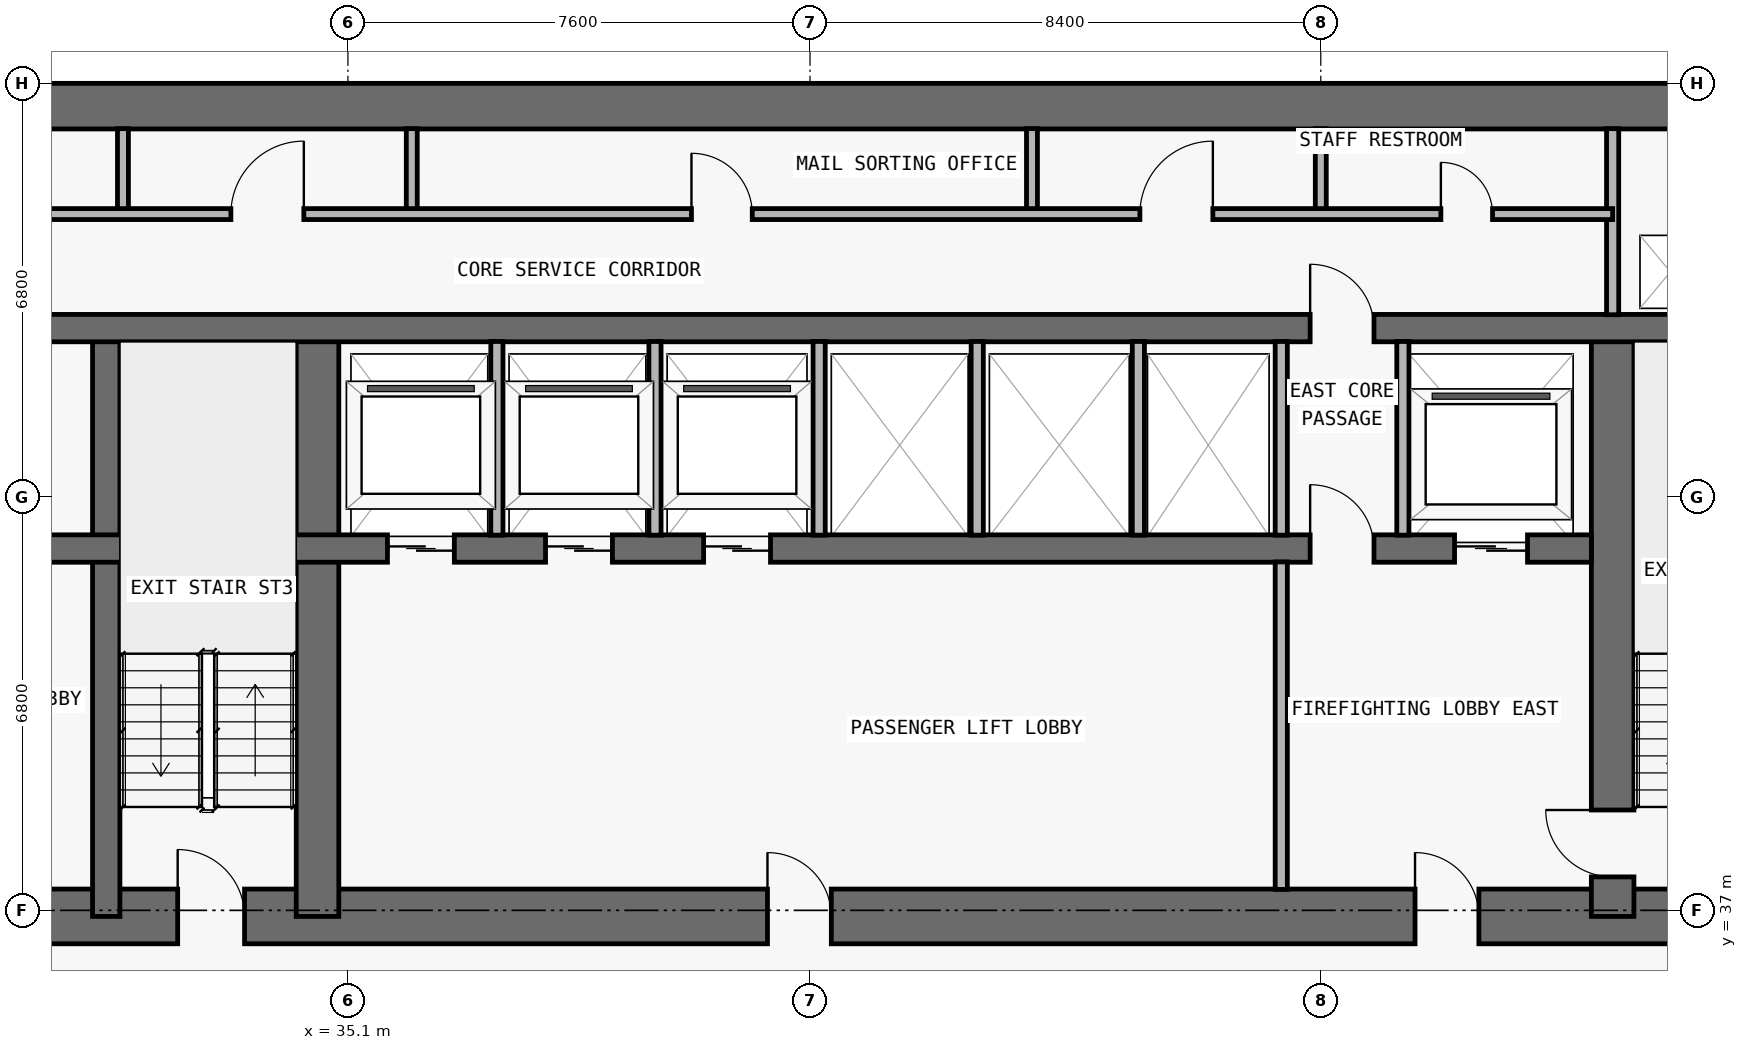
"""IFC4 building model, lengths in metres.
Left out: names, types, materials, properties, quantities, classifications, styles, units other than length and angle.
Written with IfcOpenShell. Run it as: python <this file> out.ifc"""

import sys

from ifc_helpers import new_model, si_unit, direction, frame, frame_2d, origin, place, context, subcontext, project, spatial, rectangle, extrude, element, fill, save


model = new_model("IFC4")
c1 = context("Model", 3, precision=1e-05, world=origin(), true_north=direction((0.0, 1.0)))
c2 = subcontext(c1, "Body", "Model", "MODEL_VIEW")
j1 = project(units=[si_unit("LENGTHUNIT", "METRE"), si_unit("PLANEANGLEUNIT", "RADIAN")], contexts=[c1])
p1 = place(None, origin())
s1 = spatial("IfcSite", under=j1, at=p1, CompositionType="ELEMENT")
p2 = place(p1, origin())
s2 = spatial("IfcBuilding", under=s1, at=p2, CompositionType="ELEMENT")
p3 = place(p2, frame((0.0, 0.0, 63.0)))
s3 = spatial("IfcBuildingStorey", under=s2, at=p3, CompositionType="ELEMENT", Elevation=63.0)
p4 = place(p3, frame((17.75, 36.9, 0.0), z_axis=(0.0, 0.0, 1.0), x_axis=(1.0, 0.0, 0.0)))
e1 = element("IfcWall", 1, at=p4, inside=s3, PredefinedType="SHEAR", context=c2, shape_type="SweptSolid", body=[
    extrude(rectangle(XDim=42.3, YDim=0.9, at=frame_2d((21.15, 0.0))), origin(), (0.0, 0.0, 1.0), 3.05),
])
p5 = place(p4, frame((14.55, 0.0, 0.0)))
e2 = element("IfcOpeningElement", 2, at=p5, cuts=e1, PredefinedType="OPENING", context=c2, shape_type="SweptSolid", body=[
    extrude(rectangle(XDim=1.1, YDim=2.15, at=frame_2d((0.55, 1.075))), frame((0.0, 0.46, 0.0), z_axis=(0.0, -1.0, 0.0), x_axis=(1.0, 0.0, 0.0)), (0.0, 0.0, 1.0), 0.92),
])
p6 = place(p4, frame((6.4, 0.0, 0.0)))
e3 = element("IfcOpeningElement", 3, at=p6, cuts=e1, PredefinedType="OPENING", context=c2, shape_type="SweptSolid", body=[
    extrude(rectangle(XDim=1.05, YDim=2.15, at=frame_2d((0.525, 1.075))), frame((0.0, 0.46, 0.0), z_axis=(0.0, -1.0, 0.0), x_axis=(1.0, 0.0, 0.0)), (0.0, 0.0, 1.0), 0.92),
])
p7 = place(p4, frame((34.9, 0.0, 0.0)))
e4 = element("IfcOpeningElement", 4, at=p7, cuts=e1, PredefinedType="OPENING", context=c2, shape_type="SweptSolid", body=[
    extrude(rectangle(XDim=1.05, YDim=2.15, at=frame_2d((0.525, 1.075))), frame((0.0, 0.46, 0.0), z_axis=(0.0, -1.0, 0.0), x_axis=(1.0, 0.0, 0.0)), (0.0, 0.0, 1.0), 0.92),
])
p8 = place(p4, frame((11.012, 0.0, 0.0)))
e5 = element("IfcOpeningElement", 5, at=p8, cuts=e1, PredefinedType="OPENING", context=c2, shape_type="SweptSolid", body=[
    extrude(rectangle(XDim=1.05, YDim=2.15, at=frame_2d((0.525, 1.075))), frame((0.0, 0.46, 0.0), z_axis=(0.0, -1.0, 0.0), x_axis=(1.0, 0.0, 0.0)), (0.0, 0.0, 1.0), 0.92),
])
p9 = place(p4, frame((24.25, 0.0, 0.0)))
e6 = element("IfcOpeningElement", 6, at=p9, cuts=e1, PredefinedType="OPENING", context=c2, shape_type="SweptSolid", body=[
    extrude(rectangle(XDim=1.05, YDim=2.15, at=frame_2d((0.525, 1.075))), frame((0.0, 0.46, 0.0), z_axis=(0.0, -1.0, 0.0), x_axis=(1.0, 0.0, 0.0)), (0.0, 0.0, 1.0), 0.92),
])
p10 = place(p3, frame((17.75, 50.225, 0.0), z_axis=(0.0, 0.0, 1.0), x_axis=(1.0, 0.0, 0.0)))
e7 = element("IfcWall", 7, at=p10, inside=s3, PredefinedType="SHEAR", context=c2, shape_type="SweptSolid", body=[
    extrude(rectangle(XDim=42.3, YDim=0.75, at=frame_2d((21.15, 0.0))), origin(), (0.0, 0.0, 1.0), 3.05),
])
p11 = place(p3, frame((55.9, 36.9, 0.0), z_axis=(0.0, 0.0, 1.0), x_axis=(0.0, 1.0, 0.0)))
e8 = element("IfcWall", 8, at=p11, inside=s3, PredefinedType="SHEAR", context=c2, shape_type="SweptSolid", body=[
    extrude(rectangle(XDim=9.675, YDim=0.7, at=frame_2d((4.837, 0.0))), origin(), (0.0, 0.0, 1.0), 3.05),
])
p12 = place(p11, frame((0.65, 0.0, 0.0)))
e9 = element("IfcOpeningElement", 9, at=p12, cuts=e8, PredefinedType="OPENING", context=c2, shape_type="SweptSolid", body=[
    extrude(rectangle(XDim=1.1, YDim=2.15, at=frame_2d((0.55, 1.075))), frame((0.0, 0.36, 0.0), z_axis=(0.0, -1.0, 0.0), x_axis=(1.0, 0.0, 0.0)), (0.0, 0.0, 1.0), 0.72),
])
p13 = place(p3, frame((31.125, 36.9, 0.0), z_axis=(0.0, 0.0, 1.0), x_axis=(0.0, 1.0, 0.0)))
e10 = element("IfcWall", 10, at=p13, inside=s3, PredefinedType="SHEAR", context=c2, shape_type="SweptSolid", body=[
    extrude(rectangle(XDim=9.675, YDim=0.45, at=frame_2d((4.837, 0.0))), origin(), (0.0, 0.0, 1.0), 3.05),
])
p14 = place(p3, frame((34.6, 36.9, 0.0), z_axis=(0.0, 0.0, 1.0), x_axis=(0.0, 1.0, 0.0)))
e11 = element("IfcWall", 11, at=p14, inside=s3, PredefinedType="SHEAR", context=c2, shape_type="SweptSolid", body=[
    extrude(rectangle(XDim=9.675, YDim=0.7, at=frame_2d((4.837, 0.0))), origin(), (0.0, 0.0, 1.0), 3.05),
])
p15 = place(p3, frame((22.25, 42.95, 0.0), z_axis=(0.0, 0.0, 1.0), x_axis=(1.0, 0.0, 0.0)))
e12 = element("IfcWall", 12, at=p15, inside=s3, PredefinedType="SHEAR", context=c2, shape_type="SweptSolid", body=[
    extrude(rectangle(XDim=33.3, YDim=0.45, at=frame_2d((16.65, 0.0))), origin(), (0.0, 0.0, 1.0), 3.05),
])
p16 = place(p15, frame((1.05, 0.0, 0.0)))
e13 = element("IfcOpeningElement", 13, at=p16, cuts=e12, PredefinedType="OPENING", context=c2, shape_type="SweptSolid", body=[
    extrude(rectangle(XDim=1.2, YDim=2.2, at=frame_2d((0.6, 1.1))), frame((0.0, 0.235, 0.0), z_axis=(0.0, -1.0, 0.0), x_axis=(1.0, 0.0, 0.0)), (0.0, 0.0, 1.0), 0.47),
])
p17 = place(p15, frame((31.05, 0.0, 0.0)))
e14 = element("IfcOpeningElement", 14, at=p17, cuts=e12, PredefinedType="OPENING", context=c2, shape_type="SweptSolid", body=[
    extrude(rectangle(XDim=1.2, YDim=2.2, at=frame_2d((0.6, 1.1))), frame((0.0, 0.235, 0.0), z_axis=(0.0, -1.0, 0.0), x_axis=(1.0, 0.0, 0.0)), (0.0, 0.0, 1.0), 0.47),
])
p18 = place(p15, frame((13.5, 0.0, 0.0)))
e15 = element("IfcOpeningElement", 15, at=p18, cuts=e12, PredefinedType="OPENING", context=c2, shape_type="SweptSolid", body=[
    extrude(rectangle(XDim=1.1, YDim=2.2, at=frame_2d((0.55, 1.1))), frame((0.0, 0.235, 0.0), z_axis=(0.0, -1.0, 0.0), x_axis=(1.0, 0.0, 0.0)), (0.0, 0.0, 1.0), 0.47),
])
p19 = place(p15, frame((16.1, 0.0, 0.0)))
e16 = element("IfcOpeningElement", 16, at=p19, cuts=e12, PredefinedType="OPENING", context=c2, shape_type="SweptSolid", body=[
    extrude(rectangle(XDim=1.1, YDim=2.2, at=frame_2d((0.55, 1.1))), frame((0.0, 0.235, 0.0), z_axis=(0.0, -1.0, 0.0), x_axis=(1.0, 0.0, 0.0)), (0.0, 0.0, 1.0), 0.47),
])
p20 = place(p15, frame((18.7, 0.0, 0.0)))
e17 = element("IfcOpeningElement", 17, at=p20, cuts=e12, PredefinedType="OPENING", context=c2, shape_type="SweptSolid", body=[
    extrude(rectangle(XDim=1.1, YDim=2.2, at=frame_2d((0.55, 1.1))), frame((0.0, 0.235, 0.0), z_axis=(0.0, -1.0, 0.0), x_axis=(1.0, 0.0, 0.0)), (0.0, 0.0, 1.0), 0.47),
])
p21 = place(p15, frame((3.625, 0.0, 0.0)))
e18 = element("IfcOpeningElement", 18, at=p21, cuts=e12, PredefinedType="OPENING", context=c2, shape_type="SweptSolid", body=[
    extrude(rectangle(XDim=1.05, YDim=2.15, at=frame_2d((0.525, 1.075))), frame((0.0, 0.235, 0.0), z_axis=(0.0, -1.0, 0.0), x_axis=(1.0, 0.0, 0.0)), (0.0, 0.0, 1.0), 0.47),
])
p22 = place(p15, frame((28.675, 0.0, 0.0)))
e19 = element("IfcOpeningElement", 19, at=p22, cuts=e12, PredefinedType="OPENING", context=c2, shape_type="SweptSolid", body=[
    extrude(rectangle(XDim=1.05, YDim=2.15, at=frame_2d((0.525, 1.075))), frame((0.0, 0.235, 0.0), z_axis=(0.0, -1.0, 0.0), x_axis=(1.0, 0.0, 0.0)), (0.0, 0.0, 1.0), 0.47),
])
p23 = place(p3, frame((18.2, 46.575, 0.0), z_axis=(0.0, 0.0, 1.0), x_axis=(1.0, 0.0, 0.0)))
e20 = element("IfcWall", 20, at=p23, inside=s3, PredefinedType="SHEAR", context=c2, shape_type="SweptSolid", body=[
    extrude(rectangle(XDim=41.4, YDim=0.45, at=frame_2d((20.7, 0.0))), origin(), (0.0, 0.0, 1.0), 3.05),
])
p24 = place(p23, frame((7.675, 0.0, 0.0)))
e21 = element("IfcOpeningElement", 21, at=p24, cuts=e20, PredefinedType="OPENING", context=c2, shape_type="SweptSolid", body=[
    extrude(rectangle(XDim=1.05, YDim=2.15, at=frame_2d((0.525, 1.075))), frame((0.0, 0.235, 0.0), z_axis=(0.0, -1.0, 0.0), x_axis=(1.0, 0.0, 0.0)), (0.0, 0.0, 1.0), 0.47),
])
p25 = place(p23, frame((32.725, 0.0, 0.0)))
e22 = element("IfcOpeningElement", 22, at=p25, cuts=e20, PredefinedType="OPENING", context=c2, shape_type="SweptSolid", body=[
    extrude(rectangle(XDim=1.05, YDim=2.15, at=frame_2d((0.525, 1.075))), frame((0.0, 0.235, 0.0), z_axis=(0.0, -1.0, 0.0), x_axis=(1.0, 0.0, 0.0)), (0.0, 0.0, 1.0), 0.47),
])
for number, where, z_axis, x_axis in (
    (23, (31.4, 48.45, 0.0), (0.0, 0.0, 1.0), (0.0, 1.0, 0.0)),
    (24, (36.15, 48.45, 0.0), (0.0, 0.0, 1.0), (0.0, 1.0, 0.0)),
):
    element("IfcWall", number, at=place(p3, frame(where, z_axis=z_axis, x_axis=x_axis)), inside=s3, PredefinedType="PARTITIONING", context=c2, shape_type="SweptSolid", body=[
        extrude(rectangle(XDim=1.405, YDim=0.18, at=frame_2d((0.703, 0.0))), origin(), (0.0, 0.0, 1.0), 3.05),
    ])
for number, where, z_axis, x_axis in (
    (25, (37.55, 43.17, 0.0), (0.0, 0.0, 1.0), (0.0, 1.0, 0.0)),
    (26, (40.15, 43.17, 0.0), (0.0, 0.0, 1.0), (0.0, 1.0, 0.0)),
    (27, (42.85, 43.17, 0.0), (0.0, 0.0, 1.0), (0.0, 1.0, 0.0)),
    (28, (45.45, 43.17, 0.0), (0.0, 0.0, 1.0), (0.0, 1.0, 0.0)),
):
    element("IfcWall", number, at=place(p3, frame(where, z_axis=z_axis, x_axis=x_axis)), inside=s3, PredefinedType="PARTITIONING", context=c2, shape_type="SweptSolid", body=[
        extrude(rectangle(XDim=3.185, YDim=0.2, at=frame_2d((1.593, 0.0))), origin(), (0.0, 0.0, 1.0), 3.05),
    ])
p26 = place(p3, frame((46.35, 48.45, 0.0), z_axis=(0.0, 0.0, 1.0), x_axis=(0.0, 1.0, 0.0)))
e29 = element("IfcWall", 29, at=p26, inside=s3, PredefinedType="PARTITIONING", context=c2, shape_type="SweptSolid", body=[
    extrude(rectangle(XDim=1.405, YDim=0.18, at=frame_2d((0.703, 0.0))), origin(), (0.0, 0.0, 1.0), 3.05),
])
p27 = place(p3, frame((48.1, 43.17, 0.0), z_axis=(0.0, 0.0, 1.0), x_axis=(0.0, 1.0, 0.0)))
e30 = element("IfcWall", 30, at=p27, inside=s3, PredefinedType="PARTITIONING", context=c2, shape_type="SweptSolid", body=[
    extrude(rectangle(XDim=3.185, YDim=0.2, at=frame_2d((1.593, 0.0))), origin(), (0.0, 0.0, 1.0), 3.05),
])
p28 = place(p3, frame((50.45, 37.345, 0.0), z_axis=(0.0, 0.0, 1.0), x_axis=(0.0, 1.0, 0.0)))
e31 = element("IfcWall", 31, at=p28, inside=s3, PredefinedType="PARTITIONING", context=c2, shape_type="SweptSolid", body=[
    extrude(rectangle(XDim=5.385, YDim=0.2, at=frame_2d((2.692, 0.0))), origin(), (0.0, 0.0, 1.0), 3.05),
])
p29 = place(p3, frame((50.45, 43.17, 0.0), z_axis=(0.0, 0.0, 1.0), x_axis=(0.0, 1.0, 0.0)))
e32 = element("IfcWall", 32, at=p29, inside=s3, PredefinedType="PARTITIONING", context=c2, shape_type="SweptSolid", body=[
    extrude(rectangle(XDim=3.185, YDim=0.2, at=frame_2d((1.593, 0.0))), origin(), (0.0, 0.0, 1.0), 3.05),
])
p30 = place(p3, frame((51.1, 48.45, 0.0), z_axis=(0.0, 0.0, 1.0), x_axis=(0.0, 1.0, 0.0)))
e33 = element("IfcWall", 33, at=p30, inside=s3, PredefinedType="PARTITIONING", context=c2, shape_type="SweptSolid", body=[
    extrude(rectangle(XDim=1.405, YDim=0.18, at=frame_2d((0.703, 0.0))), origin(), (0.0, 0.0, 1.0), 3.05),
])
p31 = place(p3, frame((52.45, 43.17, 0.0), z_axis=(0.0, 0.0, 1.0), x_axis=(0.0, 1.0, 0.0)))
e34 = element("IfcWall", 34, at=p31, inside=s3, PredefinedType="PARTITIONING", context=c2, shape_type="SweptSolid", body=[
    extrude(rectangle(XDim=3.185, YDim=0.2, at=frame_2d((1.593, 0.0))), origin(), (0.0, 0.0, 1.0), 3.05),
])
p32 = place(p3, frame((55.9, 46.795, 0.0), z_axis=(0.0, 0.0, 1.0), x_axis=(0.0, 1.0, 0.0)))
e35 = element("IfcWall", 35, at=p32, inside=s3, PredefinedType="PARTITIONING", context=c2, shape_type="SweptSolid", body=[
    extrude(rectangle(XDim=3.06, YDim=0.2, at=frame_2d((1.53, 0.0))), origin(), (0.0, 0.0, 1.0), 3.05),
])
p33 = place(p3, frame((26.7, 48.45, 0.0), z_axis=(0.0, 0.0, 1.0), x_axis=(1.0, 0.0, 0.0)))
e36 = element("IfcWall", 36, at=p33, inside=s3, PredefinedType="PARTITIONING", context=c2, shape_type="SweptSolid", body=[
    extrude(rectangle(XDim=29.2, YDim=0.18, at=frame_2d((14.6, 0.0))), origin(), (0.0, 0.0, 1.0), 3.05),
])
p34 = place(p33, frame((1.75, 0.0, 0.0)))
e37 = element("IfcOpeningElement", 37, at=p34, cuts=e36, PredefinedType="OPENING", context=c2, shape_type="SweptSolid", body=[
    extrude(rectangle(XDim=1.2, YDim=2.2, at=frame_2d((0.6, 1.1))), frame((0.0, 0.1, 0.0), z_axis=(0.0, -1.0, 0.0), x_axis=(1.0, 0.0, 0.0)), (0.0, 0.0, 1.0), 0.2),
])
p35 = place(p33, frame((6.475, 0.0, 0.0)))
e38 = element("IfcOpeningElement", 38, at=p35, cuts=e36, PredefinedType="OPENING", context=c2, shape_type="SweptSolid", body=[
    extrude(rectangle(XDim=1.2, YDim=2.2, at=frame_2d((0.6, 1.1))), frame((0.0, 0.1, 0.0), z_axis=(0.0, -1.0, 0.0), x_axis=(1.0, 0.0, 0.0)), (0.0, 0.0, 1.0), 0.2),
])
p36 = place(p33, frame((14.05, 0.0, 0.0)))
e39 = element("IfcOpeningElement", 39, at=p36, cuts=e36, PredefinedType="OPENING", context=c2, shape_type="SweptSolid", body=[
    extrude(rectangle(XDim=1.0, YDim=2.2, at=frame_2d((0.5, 1.1))), frame((0.0, 0.1, 0.0), z_axis=(0.0, -1.0, 0.0), x_axis=(1.0, 0.0, 0.0)), (0.0, 0.0, 1.0), 0.2),
])
p37 = place(p33, frame((21.425, 0.0, 0.0)))
e40 = element("IfcOpeningElement", 40, at=p37, cuts=e36, PredefinedType="OPENING", context=c2, shape_type="SweptSolid", body=[
    extrude(rectangle(XDim=1.2, YDim=2.2, at=frame_2d((0.6, 1.1))), frame((0.0, 0.1, 0.0), z_axis=(0.0, -1.0, 0.0), x_axis=(1.0, 0.0, 0.0)), (0.0, 0.0, 1.0), 0.2),
])
p38 = place(p33, frame((26.375, 0.0, 0.0)))
e41 = element("IfcOpeningElement", 41, at=p38, cuts=e36, PredefinedType="OPENING", context=c2, shape_type="SweptSolid", body=[
    extrude(rectangle(XDim=0.85, YDim=2.1, at=frame_2d((0.425, 1.05))), frame((0.0, 0.1, 0.0), z_axis=(0.0, -1.0, 0.0), x_axis=(1.0, 0.0, 0.0)), (0.0, 0.0, 1.0), 0.2),
])
p39 = place(p17, origin())
e42 = element("IfcDoor", 42, at=p39, inside=s3, OperationType="DOUBLE_DOOR_SLIDING", PredefinedType="DOOR", context=c2, shape_type="SweptSolid", body=[
    extrude(rectangle(XDim=1.2, YDim=2.2, at=frame_2d((0.6, 1.1))), frame((0.0, 0.025, 0.0), z_axis=(0.0, -1.0, 0.0), x_axis=(1.0, 0.0, 0.0)), (0.0, 0.0, 1.0), 0.05),
])
fill(e14, e42)
p40 = place(p18, origin())
e43 = element("IfcDoor", 43, at=p40, inside=s3, OperationType="DOUBLE_DOOR_SLIDING", PredefinedType="DOOR", context=c2, shape_type="SweptSolid", body=[
    extrude(rectangle(XDim=1.1, YDim=2.2, at=frame_2d((0.55, 1.1))), frame((0.0, 0.025, 0.0), z_axis=(0.0, -1.0, 0.0), x_axis=(1.0, 0.0, 0.0)), (0.0, 0.0, 1.0), 0.05),
])
fill(e15, e43)
p41 = place(p19, origin())
e44 = element("IfcDoor", 44, at=p41, inside=s3, OperationType="DOUBLE_DOOR_SLIDING", PredefinedType="DOOR", context=c2, shape_type="SweptSolid", body=[
    extrude(rectangle(XDim=1.1, YDim=2.2, at=frame_2d((0.55, 1.1))), frame((0.0, 0.025, 0.0), z_axis=(0.0, -1.0, 0.0), x_axis=(1.0, 0.0, 0.0)), (0.0, 0.0, 1.0), 0.05),
])
fill(e16, e44)
p42 = place(p20, origin())
e45 = element("IfcDoor", 45, at=p42, inside=s3, OperationType="DOUBLE_DOOR_SLIDING", PredefinedType="DOOR", context=c2, shape_type="SweptSolid", body=[
    extrude(rectangle(XDim=1.1, YDim=2.2, at=frame_2d((0.55, 1.1))), frame((0.0, 0.025, 0.0), z_axis=(0.0, -1.0, 0.0), x_axis=(1.0, 0.0, 0.0)), (0.0, 0.0, 1.0), 0.05),
])
fill(e17, e45)
p43 = place(p5, origin())
e46 = element("IfcDoor", 46, at=p43, inside=s3, OperationType="SINGLE_SWING_LEFT", PredefinedType="DOOR", context=c2, shape_type="SweptSolid", body=[
    extrude(rectangle(XDim=1.1, YDim=2.15, at=frame_2d((0.55, 1.075))), frame((0.0, 0.025, 0.0), z_axis=(0.0, -1.0, 0.0), x_axis=(1.0, 0.0, 0.0)), (0.0, 0.0, 1.0), 0.05),
])
fill(e2, e46)
p44 = place(p7, origin())
e47 = element("IfcDoor", 47, at=p44, inside=s3, OperationType="SINGLE_SWING_LEFT", PredefinedType="DOOR", context=c2, shape_type="SweptSolid", body=[
    extrude(rectangle(XDim=1.05, YDim=2.15, at=frame_2d((0.525, 1.075))), frame((0.0, 0.025, 0.0), z_axis=(0.0, -1.0, 0.0), x_axis=(1.0, 0.0, 0.0)), (0.0, 0.0, 1.0), 0.05),
])
fill(e4, e47)
p45 = place(p12, origin())
e48 = element("IfcDoor", 48, at=p45, inside=s3, OperationType="SINGLE_SWING_RIGHT", PredefinedType="DOOR", context=c2, shape_type="SweptSolid", body=[
    extrude(rectangle(XDim=1.1, YDim=2.15, at=frame_2d((0.55, 1.075))), frame((0.0, 0.025, 0.0), z_axis=(0.0, -1.0, 0.0), x_axis=(1.0, 0.0, 0.0)), (0.0, 0.0, 1.0), 0.05),
])
fill(e9, e48)
p46 = place(p22, origin())
e49 = element("IfcDoor", 49, at=p46, inside=s3, OperationType="SINGLE_SWING_LEFT", PredefinedType="DOOR", context=c2, shape_type="SweptSolid", body=[
    extrude(rectangle(XDim=1.05, YDim=2.15, at=frame_2d((0.525, 1.075))), frame((0.0, 0.025, 0.0), z_axis=(0.0, -1.0, 0.0), x_axis=(1.0, 0.0, 0.0)), (0.0, 0.0, 1.0), 0.05),
])
fill(e19, e49)
p47 = place(p9, origin())
e50 = element("IfcDoor", 50, at=p47, inside=s3, OperationType="SINGLE_SWING_LEFT", PredefinedType="DOOR", context=c2, shape_type="SweptSolid", body=[
    extrude(rectangle(XDim=1.05, YDim=2.15, at=frame_2d((0.525, 1.075))), frame((0.0, 0.025, 0.0), z_axis=(0.0, -1.0, 0.0), x_axis=(1.0, 0.0, 0.0)), (0.0, 0.0, 1.0), 0.05),
])
fill(e6, e50)
p48 = place(p25, origin())
e51 = element("IfcDoor", 51, at=p48, inside=s3, OperationType="SINGLE_SWING_LEFT", PredefinedType="DOOR", context=c2, shape_type="SweptSolid", body=[
    extrude(rectangle(XDim=1.05, YDim=2.15, at=frame_2d((0.525, 1.075))), frame((0.0, 0.025, 0.0), z_axis=(0.0, -1.0, 0.0), x_axis=(1.0, 0.0, 0.0)), (0.0, 0.0, 1.0), 0.05),
])
fill(e22, e51)
p49 = place(p35, origin())
e52 = element("IfcDoor", 52, at=p49, inside=s3, OperationType="SINGLE_SWING_RIGHT", PredefinedType="DOOR", context=c2, shape_type="SweptSolid", body=[
    extrude(rectangle(XDim=1.2, YDim=2.2, at=frame_2d((0.6, 1.1))), frame((0.0, 0.025, 0.0), z_axis=(0.0, -1.0, 0.0), x_axis=(1.0, 0.0, 0.0)), (0.0, 0.0, 1.0), 0.05),
])
fill(e38, e52)
p50 = place(p36, origin())
e53 = element("IfcDoor", 53, at=p50, inside=s3, OperationType="SINGLE_SWING_LEFT", PredefinedType="DOOR", context=c2, shape_type="SweptSolid", body=[
    extrude(rectangle(XDim=1.0, YDim=2.2, at=frame_2d((0.5, 1.1))), frame((0.0, 0.025, 0.0), z_axis=(0.0, -1.0, 0.0), x_axis=(1.0, 0.0, 0.0)), (0.0, 0.0, 1.0), 0.05),
])
fill(e39, e53)
p51 = place(p37, origin())
e54 = element("IfcDoor", 54, at=p51, inside=s3, OperationType="SINGLE_SWING_RIGHT", PredefinedType="DOOR", context=c2, shape_type="SweptSolid", body=[
    extrude(rectangle(XDim=1.2, YDim=2.2, at=frame_2d((0.6, 1.1))), frame((0.0, 0.025, 0.0), z_axis=(0.0, -1.0, 0.0), x_axis=(1.0, 0.0, 0.0)), (0.0, 0.0, 1.0), 0.05),
])
fill(e40, e54)
p52 = place(p38, origin())
e55 = element("IfcDoor", 55, at=p52, inside=s3, OperationType="SINGLE_SWING_LEFT", PredefinedType="DOOR", context=c2, shape_type="SweptSolid", body=[
    extrude(rectangle(XDim=0.85, YDim=2.1, at=frame_2d((0.425, 1.05))), frame((0.0, 0.025, 0.0), z_axis=(0.0, -1.0, 0.0), x_axis=(1.0, 0.0, 0.0)), (0.0, 0.0, 1.0), 0.05),
])
fill(e41, e55)
save(model, sys.argv[1])
